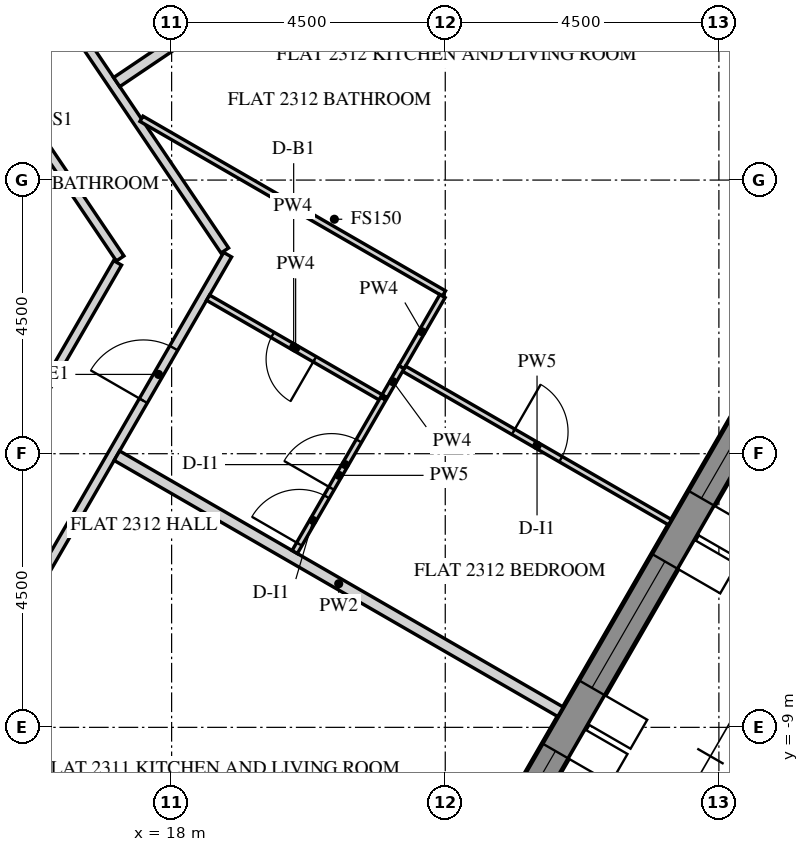
"""IFC4 building model, lengths in metres.
Left out: names, types, materials, properties, quantities, classifications, styles, units other than length and angle.
Written with IfcOpenShell. Run it as: python <this file> out.ifc"""

import sys

from ifc_helpers import new_model, si_unit, direction, frame, frame_2d, origin, place, context, subcontext, project, spatial, polyline, rectangle, outline, extrude, element, fill, save


model = new_model("IFC4")
c1 = context("Model", 3, precision=1e-05, world=origin(), true_north=direction((0.0, 1.0)))
c2 = subcontext(c1, "Body", "Model", "MODEL_VIEW")
j1 = project(units=[si_unit("LENGTHUNIT", "METRE"), si_unit("PLANEANGLEUNIT", "RADIAN")], contexts=[c1])
p1 = place(None, origin())
s1 = spatial("IfcSite", under=j1, at=p1, CompositionType="ELEMENT")
p2 = place(p1, origin())
s2 = spatial("IfcBuilding", under=s1, at=p2, CompositionType="ELEMENT")
p3 = place(p2, frame((0.0, 0.0, 291.3)))
s3 = spatial("IfcBuildingStorey", under=s2, at=p3, CompositionType="ELEMENT", Elevation=291.3)
p4 = place(p3, frame((16.451, -23.005, -0.15), z_axis=(0.0, 0.0, 1.0), x_axis=(0.500003737743, 0.866023245787, 0.0)))
e1 = element("IfcWall", 1, at=p4, inside=s3, PredefinedType="SOLIDWALL", context=c2, shape_type="SweptSolid", body=[
    extrude(outline(polyline([(-0.021, -0.25), (25.468, -0.25), (25.421, 0.25), (0.021, 0.25), (-0.021, -0.25)])), origin(), (0.0, 0.0, 1.0), 3.9),
])
p5 = place(p4, frame((2.522, 0.0, 0.75)))
e2 = element("IfcOpeningElement", 2, at=p5, cuts=e1, PredefinedType="OPENING", context=c2, shape_type="SweptSolid", body=[
    extrude(rectangle(XDim=2.4, YDim=2.7, at=frame_2d((1.2, 1.35))), frame((0.0, 0.26, 0.0), z_axis=(0.0, -1.0, 0.0), x_axis=(1.0, 0.0, 0.0)), (0.0, 0.0, 1.0), 0.52),
])
p6 = place(p4, frame((6.122, 0.0, 0.75)))
e3 = element("IfcOpeningElement", 3, at=p6, cuts=e1, PredefinedType="OPENING", context=c2, shape_type="SweptSolid", body=[
    extrude(rectangle(XDim=2.4, YDim=2.7, at=frame_2d((1.2, 1.35))), frame((0.0, 0.26, 0.0), z_axis=(0.0, -1.0, 0.0), x_axis=(1.0, 0.0, 0.0)), (0.0, 0.0, 1.0), 0.52),
])
p7 = place(p4, frame((9.722, 0.0, 0.75)))
e4 = element("IfcOpeningElement", 4, at=p7, cuts=e1, PredefinedType="OPENING", context=c2, shape_type="SweptSolid", body=[
    extrude(rectangle(XDim=2.4, YDim=2.7, at=frame_2d((1.2, 1.35))), frame((0.0, 0.26, 0.0), z_axis=(0.0, -1.0, 0.0), x_axis=(1.0, 0.0, 0.0)), (0.0, 0.0, 1.0), 0.52),
])
p8 = place(p4, frame((13.323, 0.0, 0.75)))
e5 = element("IfcOpeningElement", 5, at=p8, cuts=e1, PredefinedType="OPENING", context=c2, shape_type="SweptSolid", body=[
    extrude(rectangle(XDim=2.4, YDim=2.7, at=frame_2d((1.2, 1.35))), frame((0.0, 0.26, 0.0), z_axis=(0.0, -1.0, 0.0), x_axis=(1.0, 0.0, 0.0)), (0.0, 0.0, 1.0), 0.52),
])
p9 = place(p4, frame((16.922, 0.0, 0.75)))
e6 = element("IfcOpeningElement", 6, at=p9, cuts=e1, PredefinedType="OPENING", context=c2, shape_type="SweptSolid", body=[
    extrude(rectangle(XDim=2.4, YDim=2.7, at=frame_2d((1.2, 1.35))), frame((0.0, 0.26, 0.0), z_axis=(0.0, -1.0, 0.0), x_axis=(1.0, 0.0, 0.0)), (0.0, 0.0, 1.0), 0.52),
])
p10 = place(p4, frame((20.522, 0.0, 0.75)))
e7 = element("IfcOpeningElement", 7, at=p10, cuts=e1, PredefinedType="OPENING", context=c2, shape_type="SweptSolid", body=[
    extrude(rectangle(XDim=2.4, YDim=2.7, at=frame_2d((1.2, 1.35))), frame((0.0, 0.26, 0.0), z_axis=(0.0, -1.0, 0.0), x_axis=(1.0, 0.0, 0.0)), (0.0, 0.0, 1.0), 0.52),
])
p11 = place(p3, frame((11.447, -14.174, 0.0), z_axis=(0.0, 0.0, 1.0), x_axis=(0.500003306199, 0.866023494941, 0.0)))
e8 = element("IfcWall", 8, at=p11, inside=s3, PredefinedType="PARTITIONING", context=c2, shape_type="SweptSolid", body=[
    extrude(rectangle(XDim=14.949, YDim=0.15, at=frame_2d((7.475, 0.0))), origin(), (0.0, 0.0, 1.0), 2.988),
])
p12 = place(p11, frame((2.325, 0.0, 0.0)))
e9 = element("IfcOpeningElement", 9, at=p12, cuts=e8, PredefinedType="OPENING", context=c2, shape_type="SweptSolid", body=[
    extrude(rectangle(XDim=1.0, YDim=2.1, at=frame_2d((0.5, 1.05))), frame((0.0, 0.085, 0.0), z_axis=(0.0, -1.0, 0.0), x_axis=(1.0, 0.0, 0.0)), (0.0, 0.0, 1.0), 0.17),
])
p13 = place(p11, frame((12.177, 0.0, 0.0)))
e10 = element("IfcOpeningElement", 10, at=p13, cuts=e8, PredefinedType="OPENING", context=c2, shape_type="SweptSolid", body=[
    extrude(rectangle(XDim=1.0, YDim=2.1, at=frame_2d((0.5, 1.05))), frame((0.0, 0.085, 0.0), z_axis=(0.0, -1.0, 0.0), x_axis=(1.0, 0.0, 0.0)), (0.0, 0.0, 1.0), 0.17),
])
p14 = place(p3, frame((18.875, -1.158, 0.0), z_axis=(0.0, 0.0, 1.0), x_axis=(-0.55919880344, 0.829033592945, 0.0)))
e11 = element("IfcWall", 11, at=p14, inside=s3, PredefinedType="PARTITIONING", context=c2, shape_type="SweptSolid", body=[
    extrude(rectangle(XDim=16.939, YDim=0.15, at=frame_2d((8.47, 0.0))), origin(), (0.0, 0.0, 1.0), 2.988),
])
p15 = place(p14, frame((6.09, 0.0, 0.0)))
e12 = element("IfcOpeningElement", 12, at=p15, cuts=e11, PredefinedType="OPENING", context=c2, shape_type="SweptSolid", body=[
    extrude(rectangle(XDim=1.0, YDim=2.1, at=frame_2d((0.5, 1.05))), frame((0.0, 0.085, 0.0), z_axis=(0.0, -1.0, 0.0), x_axis=(1.0, 0.0, 0.0)), (0.0, 0.0, 1.0), 0.17),
])
p16 = place(p3, frame((12.367, 5.808, 0.0), z_axis=(0.0, 0.0, 1.0), x_axis=(0.559187256666, -0.829041381345, 0.0)))
e13 = element("IfcWall", 13, at=p16, inside=s3, PredefinedType="PARTITIONING", context=c2, shape_type="SweptSolid", body=[
    extrude(rectangle(XDim=8.56, YDim=0.15, at=frame_2d((4.28, 0.0))), origin(), (0.0, 0.0, 1.0), 2.988),
])
p17 = place(p16, frame((3.83, 0.0, 0.0)))
e14 = element("IfcOpeningElement", 14, at=p17, cuts=e13, PredefinedType="OPENING", context=c2, shape_type="SweptSolid", body=[
    extrude(rectangle(XDim=0.9, YDim=2.1, at=frame_2d((0.45, 1.05))), frame((0.0, 0.085, 0.0), z_axis=(0.0, -1.0, 0.0), x_axis=(1.0, 0.0, 0.0)), (0.0, 0.0, 1.0), 0.17),
])
p18 = place(p3, frame((17.112, -1.362, 0.0), z_axis=(0.0, 0.0, 1.0), x_axis=(-0.49999985423, -0.866025487945, 0.0)))
e15 = element("IfcWall", 15, at=p18, inside=s3, PredefinedType="PARTITIONING", context=c2, shape_type="SweptSolid", body=[
    extrude(rectangle(XDim=6.298, YDim=0.15, at=frame_2d((3.149, 0.0))), origin(), (0.0, 0.0, 1.0), 2.988),
])
p19 = place(p3, frame((24.396, -8.745, 0.0), z_axis=(0.0, 0.0, 1.0), x_axis=(-0.866014270972, 0.500019282102, 0.0)))
e16 = element("IfcWall", 16, at=p19, inside=s3, PredefinedType="PARTITIONING", context=c2, shape_type="SweptSolid", body=[
    extrude(rectangle(XDim=8.425, YDim=0.18, at=frame_2d((4.212, 0.0))), origin(), (0.0, 0.0, 1.0), 2.988),
])
p20 = place(p3, frame((17.504, 1.008, 0.0), z_axis=(0.0, 0.0, 1.0), x_axis=(0.866022112445, -0.500005700723, 0.0)))
e17 = element("IfcWall", 17, at=p20, inside=s3, PredefinedType="PARTITIONING", context=c2, shape_type="SweptSolid", body=[
    extrude(rectangle(XDim=5.745, YDim=0.1, at=frame_2d((2.873, 0.0))), origin(), (0.0, 0.0, 1.0), 2.988),
])
p21 = place(p3, frame((22.454, -1.908, 0.0), z_axis=(0.0, 0.0, 1.0), x_axis=(-0.500003806764, -0.866023205937, 0.0)))
e18 = element("IfcWall", 18, at=p21, inside=s3, PredefinedType="PARTITIONING", context=c2, shape_type="SweptSolid", body=[
    extrude(rectangle(XDim=1.352, YDim=0.1, at=frame_2d((0.676, 0.0))), origin(), (0.0, 0.0, 1.0), 2.988),
])
p22 = place(p3, frame((21.823, -3.102, 0.0), z_axis=(0.0, 0.0, 1.0), x_axis=(0.866018134068, -0.500012591307, 0.0)))
e19 = element("IfcWall", 19, at=p22, inside=s3, PredefinedType="PARTITIONING", context=c2, shape_type="SweptSolid", body=[
    extrude(rectangle(XDim=5.05, YDim=0.1, at=frame_2d((2.525, 0.0))), origin(), (0.0, 0.0, 1.0), 2.988),
])
p23 = place(p22, frame((2.075, 0.0, 0.0)))
e20 = element("IfcOpeningElement", 20, at=p23, cuts=e19, PredefinedType="OPENING", context=c2, shape_type="SweptSolid", body=[
    extrude(rectangle(XDim=0.9, YDim=2.1, at=frame_2d((0.45, 1.05))), frame((0.0, 0.06, 0.0), z_axis=(0.0, -1.0, 0.0), x_axis=(1.0, 0.0, 0.0)), (0.0, 0.0, 1.0), 0.12),
])
p24 = place(p3, frame((24.082, 6.323, 0.0), z_axis=(0.0, 0.0, 1.0), x_axis=(-0.829037762759, -0.559192621481, 0.0)))
e21 = element("IfcWall", 21, at=p24, inside=s3, PredefinedType="PARTITIONING", context=c2, shape_type="SweptSolid", body=[
    extrude(rectangle(XDim=8.425, YDim=0.18, at=frame_2d((4.212, 0.0))), origin(), (0.0, 0.0, 1.0), 2.988),
])
p25 = place(p3, frame((21.479, -3.597, 0.0), z_axis=(0.0, 0.0, 1.0), x_axis=(-0.866033959199, 0.499985181294, 0.0)))
e22 = element("IfcWall", 22, at=p25, inside=s3, PredefinedType="PARTITIONING", context=c2, shape_type="SweptSolid", body=[
    extrude(rectangle(XDim=3.325, YDim=0.1, at=frame_2d((1.662, 0.0))), origin(), (0.0, 0.0, 1.0), 2.988),
])
p26 = place(p25, frame((1.3, 0.0, 0.0)))
e23 = element("IfcOpeningElement", 23, at=p26, cuts=e22, PredefinedType="OPENING", context=c2, shape_type="SweptSolid", body=[
    extrude(rectangle(XDim=0.8, YDim=2.1, at=frame_2d((0.4, 1.05))), frame((0.0, 0.06, 0.0), z_axis=(0.0, -1.0, 0.0), x_axis=(1.0, 0.0, 0.0)), (0.0, 0.0, 1.0), 0.12),
])
p27 = place(p3, frame((20.024, -6.117, 0.0), z_axis=(0.0, 0.0, 1.0), x_axis=(0.499935340648, 0.866062731661, 0.0)))
e24 = element("IfcWall", 24, at=p27, inside=s3, PredefinedType="PARTITIONING", context=c2, shape_type="SweptSolid", body=[
    extrude(rectangle(XDim=2.912, YDim=0.1, at=frame_2d((1.456, 0.0))), origin(), (0.0, 0.0, 1.0), 2.988),
])
p28 = place(p27, frame((0.15, 0.0, 0.0)))
e25 = element("IfcOpeningElement", 25, at=p28, cuts=e24, PredefinedType="OPENING", context=c2, shape_type="SweptSolid", body=[
    extrude(rectangle(XDim=0.9, YDim=2.1, at=frame_2d((0.45, 1.05))), frame((0.0, 0.06, 0.0), z_axis=(0.0, -1.0, 0.0), x_axis=(1.0, 0.0, 0.0)), (0.0, 0.0, 1.0), 0.12),
])
p29 = place(p27, frame((1.21, 0.0, 0.0)))
e26 = element("IfcOpeningElement", 26, at=p29, cuts=e24, PredefinedType="OPENING", context=c2, shape_type="SweptSolid", body=[
    extrude(rectangle(XDim=0.9, YDim=2.1, at=frame_2d((0.45, 1.05))), frame((0.0, 0.06, 0.0), z_axis=(0.0, -1.0, 0.0), x_axis=(1.0, 0.0, 0.0)), (0.0, 0.0, 1.0), 0.12),
])
p30 = place(p3, frame((21.503, -3.555, 0.0), z_axis=(0.0, 0.0, 1.0), x_axis=(0.499850094852, 0.866111934265, 0.0)))
e27 = element("IfcWall", 27, at=p30, inside=s3, PredefinedType="PARTITIONING", context=c2, shape_type="SweptSolid", body=[
    extrude(rectangle(XDim=0.552, YDim=0.1, at=frame_2d((0.276, 0.0))), origin(), (0.0, 0.0, 1.0), 2.988),
])
p31 = place(p8, frame((0.0, 0.18, 0.0)))
e28 = element("IfcWindow", 28, at=p31, inside=s3, PartitioningType="DOUBLE_PANEL_VERTICAL", PredefinedType="WINDOW", context=c2, shape_type="SweptSolid", body=[
    extrude(rectangle(XDim=2.4, YDim=2.7, at=frame_2d((1.2, 1.35))), frame((0.0, 0.03, 0.0), z_axis=(0.0, -1.0, 0.0), x_axis=(1.0, 0.0, 0.0)), (0.0, 0.0, 1.0), 0.06),
])
fill(e5, e28)
p32 = place(p9, frame((0.0, 0.18, 0.0)))
e29 = element("IfcWindow", 29, at=p32, inside=s3, PartitioningType="DOUBLE_PANEL_VERTICAL", PredefinedType="WINDOW", context=c2, shape_type="SweptSolid", body=[
    extrude(rectangle(XDim=2.4, YDim=2.7, at=frame_2d((1.2, 1.35))), frame((0.0, 0.03, 0.0), z_axis=(0.0, -1.0, 0.0), x_axis=(1.0, 0.0, 0.0)), (0.0, 0.0, 1.0), 0.06),
])
fill(e6, e29)
p33 = place(p10, frame((0.0, 0.18, 0.0)))
e30 = element("IfcWindow", 30, at=p33, inside=s3, PartitioningType="DOUBLE_PANEL_VERTICAL", PredefinedType="WINDOW", context=c2, shape_type="SweptSolid", body=[
    extrude(rectangle(XDim=2.4, YDim=2.7, at=frame_2d((1.2, 1.35))), frame((0.0, 0.03, 0.0), z_axis=(0.0, -1.0, 0.0), x_axis=(1.0, 0.0, 0.0)), (0.0, 0.0, 1.0), 0.06),
])
fill(e7, e30)
p34 = place(p13, origin())
e31 = element("IfcDoor", 31, at=p34, inside=s3, OperationType="SINGLE_SWING_LEFT", PredefinedType="DOOR", context=c2, shape_type="SweptSolid", body=[
    extrude(rectangle(XDim=1.0, YDim=2.1, at=frame_2d((0.5, 1.05))), frame((0.0, 0.025, 0.0), z_axis=(0.0, -1.0, 0.0), x_axis=(1.0, 0.0, 0.0)), (0.0, 0.0, 1.0), 0.05),
])
fill(e10, e31)
p35 = place(p26, origin())
e32 = element("IfcDoor", 32, at=p35, inside=s3, OperationType="SINGLE_SWING_LEFT", PredefinedType="DOOR", context=c2, shape_type="SweptSolid", body=[
    extrude(rectangle(XDim=0.8, YDim=2.1, at=frame_2d((0.4, 1.05))), frame((0.0, 0.025, 0.0), z_axis=(0.0, -1.0, 0.0), x_axis=(1.0, 0.0, 0.0)), (0.0, 0.0, 1.0), 0.05),
])
fill(e23, e32)
p36 = place(p28, origin())
e33 = element("IfcDoor", 33, at=p36, inside=s3, OperationType="SINGLE_SWING_LEFT", PredefinedType="DOOR", context=c2, shape_type="SweptSolid", body=[
    extrude(rectangle(XDim=0.9, YDim=2.1, at=frame_2d((0.45, 1.05))), frame((0.0, 0.025, 0.0), z_axis=(0.0, -1.0, 0.0), x_axis=(1.0, 0.0, 0.0)), (0.0, 0.0, 1.0), 0.05),
])
fill(e25, e33)
p37 = place(p29, origin())
e34 = element("IfcDoor", 34, at=p37, inside=s3, OperationType="SINGLE_SWING_LEFT", PredefinedType="DOOR", context=c2, shape_type="SweptSolid", body=[
    extrude(rectangle(XDim=0.9, YDim=2.1, at=frame_2d((0.45, 1.05))), frame((0.0, 0.025, 0.0), z_axis=(0.0, -1.0, 0.0), x_axis=(1.0, 0.0, 0.0)), (0.0, 0.0, 1.0), 0.05),
])
fill(e26, e34)
p38 = place(p23, origin())
e35 = element("IfcDoor", 35, at=p38, inside=s3, OperationType="SINGLE_SWING_RIGHT", PredefinedType="DOOR", context=c2, shape_type="SweptSolid", body=[
    extrude(rectangle(XDim=0.9, YDim=2.1, at=frame_2d((0.45, 1.05))), frame((0.0, 0.025, 0.0), z_axis=(0.0, -1.0, 0.0), x_axis=(1.0, 0.0, 0.0)), (0.0, 0.0, 1.0), 0.05),
])
fill(e20, e35)
save(model, sys.argv[1])
